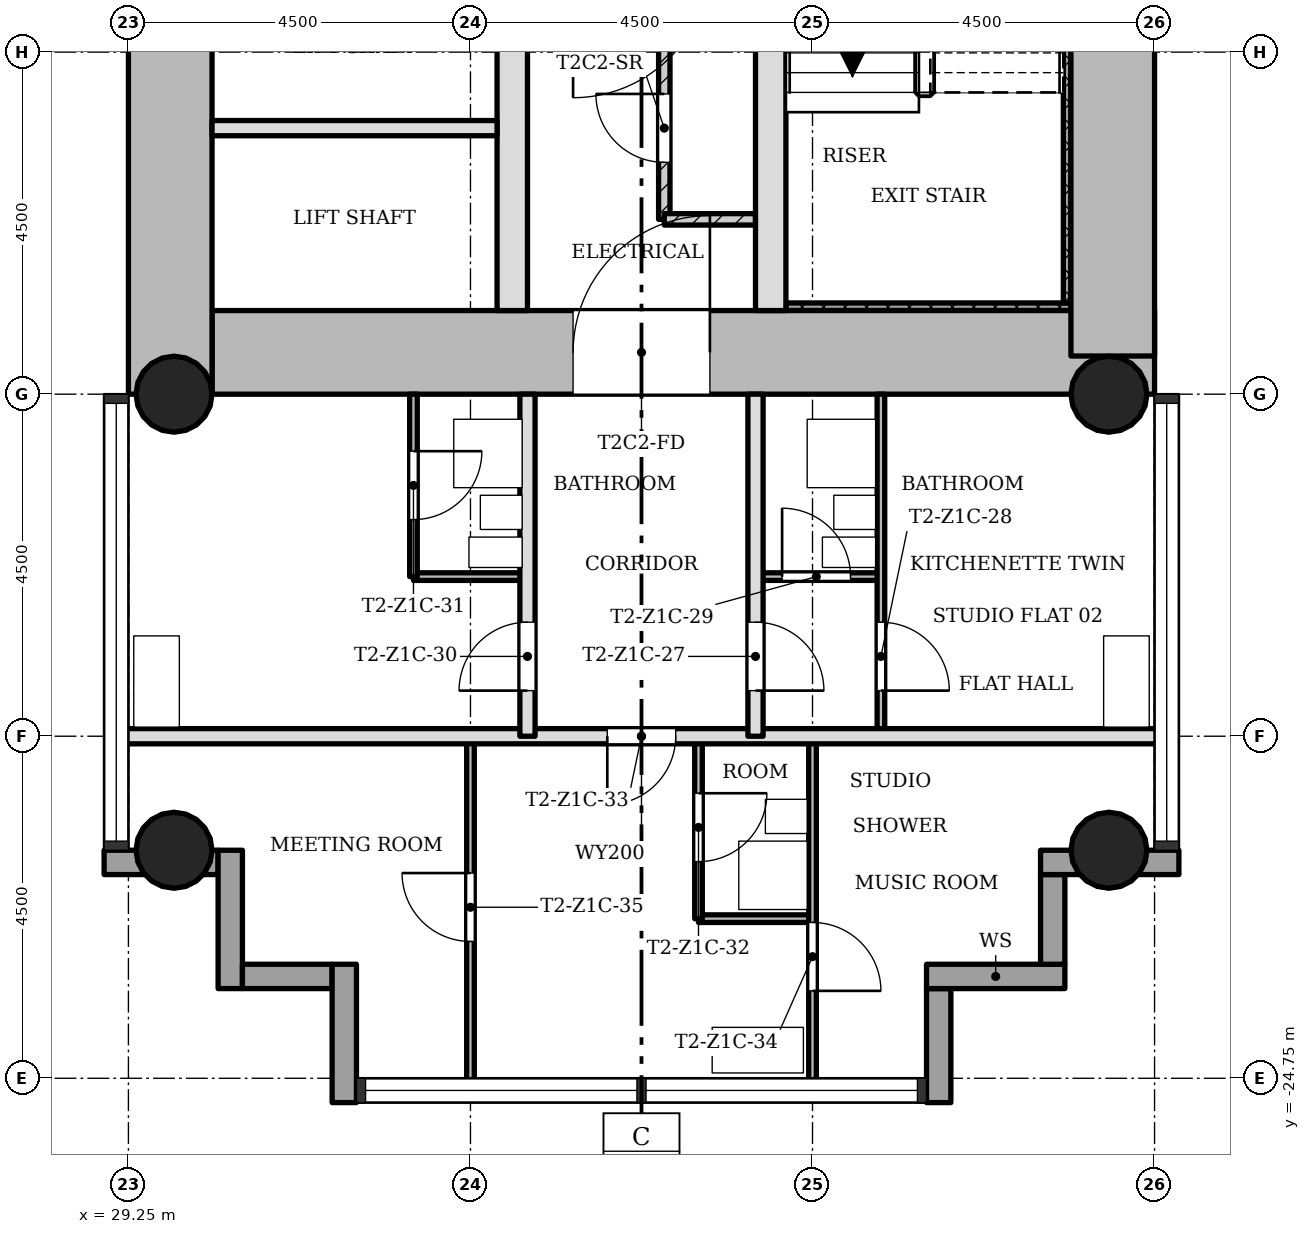
"""IFC4 building model, lengths in metres.
Left out: names, types, materials, properties, quantities, classifications, styles, units other than length and angle.
Written with IfcOpenShell. Run it as: python <this file> out.ifc"""

import sys

from ifc_helpers import new_model, si_unit, direction, frame, frame_2d, origin, origin_2d, place, context, subcontext, project, spatial, rectangle, hollow_circle, extrude, element, fill, save


model = new_model("IFC4")
c1 = context("Model", 3, precision=1e-05, world=origin(), true_north=direction((0.0, 1.0)))
c2 = subcontext(c1, "Body", "Model", "MODEL_VIEW")
j1 = project(units=[si_unit("LENGTHUNIT", "METRE"), si_unit("PLANEANGLEUNIT", "RADIAN")], contexts=[c1])
p1 = place(None, origin())
s1 = spatial("IfcSite", under=j1, at=p1, CompositionType="ELEMENT")
p2 = place(p1, origin())
s2 = spatial("IfcBuilding", under=s1, at=p2, CompositionType="ELEMENT")
p3 = place(p2, frame((0.0, 0.0, 48.3)))
s3 = spatial("IfcBuildingStorey", under=s2, at=p3, CompositionType="ELEMENT", Elevation=48.3)
p4 = place(p3, frame((30.35, -15.2, 0.0), z_axis=(0.0, 0.0, 1.0), x_axis=(1.0, 0.0, 0.0)))
e1 = element("IfcWall", 1, at=p4, inside=s3, PredefinedType="SHEAR", context=c2, shape_type="SweptSolid", body=[
    extrude(rectangle(XDim=12.4, YDim=1.1, at=frame_2d((6.2, 0.0))), origin(), (0.0, 0.0, 1.0), 3.4),
])
p5 = place(p4, frame((4.75, 0.0, 0.0)))
e2 = element("IfcOpeningElement", 2, at=p5, cuts=e1, PredefinedType="OPENING", context=c2, shape_type="SweptSolid", body=[
    extrude(rectangle(XDim=1.8, YDim=2.1, at=frame_2d((0.9, 1.05))), frame((0.0, 0.56, 0.0), z_axis=(0.0, -1.0, 0.0), x_axis=(1.0, 0.0, 0.0)), (0.0, 0.0, 1.0), 1.12),
])
p6 = place(p3, frame((42.2, -15.248, 0.0), z_axis=(0.0, 0.0, 1.0), x_axis=(0.0, 1.0, 0.0)))
e3 = element("IfcWall", 3, at=p6, inside=s3, PredefinedType="SHEAR", context=c2, shape_type="SweptSolid", body=[
    extrude(rectangle(XDim=8.596, YDim=1.1, at=frame_2d((4.298, 0.0))), origin(), (0.0, 0.0, 1.0), 3.4),
])
p7 = place(p3, frame((29.8, -7.85, 0.0), z_axis=(0.0, 0.0, 1.0), x_axis=(0.0, -1.0, 0.0)))
e4 = element("IfcWall", 4, at=p7, inside=s3, PredefinedType="SHEAR", context=c2, shape_type="SweptSolid", body=[
    extrude(rectangle(XDim=7.9, YDim=1.1, at=frame_2d((3.95, 0.0))), origin(), (0.0, 0.0, 1.0), 3.4),
])
p8 = place(p3, frame((34.3, -14.65, 0.0), z_axis=(0.0, 0.0, 1.0), x_axis=(0.0, 1.0, 0.0)))
e5 = element("IfcWall", 5, at=p8, inside=s3, PredefinedType="SHEAR", context=c2, shape_type="SweptSolid", body=[
    extrude(rectangle(XDim=6.8, YDim=0.4, at=frame_2d((3.4, 0.0))), origin(), (0.0, 0.0, 1.0), 3.4),
])
p9 = place(p8, frame((5.05, 0.0, 0.0)))
e6 = element("IfcOpeningElement", 6, at=p9, cuts=e5, PredefinedType="OPENING", context=c2, shape_type="SweptSolid", body=[
    extrude(rectangle(XDim=1.1, YDim=2.1, at=frame_2d((0.55, 1.05))), frame((0.0, 0.21, 0.0), z_axis=(0.0, -1.0, 0.0), x_axis=(1.0, 0.0, 0.0)), (0.0, 0.0, 1.0), 0.42),
])
p10 = place(p3, frame((37.7, -14.65, 0.0), z_axis=(0.0, 0.0, 1.0), x_axis=(0.0, 1.0, 0.0)))
e7 = element("IfcWall", 7, at=p10, inside=s3, PredefinedType="SHEAR", context=c2, shape_type="SweptSolid", body=[
    extrude(rectangle(XDim=6.8, YDim=0.4, at=frame_2d((3.4, 0.0))), origin(), (0.0, 0.0, 1.0), 3.4),
])
p11 = place(p10, frame((5.35, 0.0, 0.0)))
e8 = element("IfcOpeningElement", 8, at=p11, cuts=e7, PredefinedType="OPENING", context=c2, shape_type="SweptSolid", body=[
    extrude(rectangle(XDim=0.9, YDim=2.1, at=frame_2d((0.45, 1.05))), frame((0.0, 0.21, 0.0), z_axis=(0.0, -1.0, 0.0), x_axis=(1.0, 0.0, 0.0)), (0.0, 0.0, 1.0), 0.42),
])
for number, where, z_axis, x_axis in (
    (9, (42.15, -15.75, 0.0), (0.0, 0.0, 1.0), (1.0, 0.0, 0.0)),
    (10, (29.85, -15.75, 0.0), (0.0, 0.0, 1.0), (1.0, 0.0, 0.0)),
    (11, (42.15, -21.75, 0.0), (0.0, 0.0, 1.0), (1.0, 0.0, 0.0)),
    (12, (29.85, -21.75, 0.0), (0.0, 0.0, 1.0), (1.0, 0.0, 0.0)),
):
    element("IfcColumn", number, at=place(p3, frame(where, z_axis=z_axis, x_axis=x_axis)), inside=s3, PredefinedType="COLUMN", context=c2, shape_type="SweptSolid", body=[
        extrude(hollow_circle(Radius=0.5, WallThickness=0.036, at=origin_2d()), origin(), (0.0, 0.0, 1.0), 3.4),
    ])
p12 = place(p3, frame((39.91, -25.07, -0.3), z_axis=(0.0, 0.0, 1.0), x_axis=(0.0, 1.0, 0.0)))
e13 = element("IfcWall", 13, at=p12, inside=s3, PredefinedType="STANDARD", context=c2, shape_type="SweptSolid", body=[
    extrude(rectangle(XDim=1.5, YDim=0.32, at=frame_2d((0.75, 0.0))), origin(), (0.0, 0.0, 1.0), 3.4),
])
p13 = place(p3, frame((39.75, -23.41, -0.3), z_axis=(0.0, 0.0, 1.0), x_axis=(1.0, 0.0, 0.0)))
e14 = element("IfcWall", 14, at=p13, inside=s3, PredefinedType="STANDARD", context=c2, shape_type="SweptSolid", body=[
    extrude(rectangle(XDim=1.82, YDim=0.32, at=frame_2d((0.91, 0.0))), origin(), (0.0, 0.0, 1.0), 3.4),
])
p14 = place(p3, frame((41.41, -23.25, -0.3), z_axis=(0.0, 0.0, 1.0), x_axis=(0.0, 1.0, 0.0)))
e15 = element("IfcWall", 15, at=p14, inside=s3, PredefinedType="STANDARD", context=c2, shape_type="SweptSolid", body=[
    extrude(rectangle(XDim=1.18, YDim=0.32, at=frame_2d((0.59, 0.0))), origin(), (0.0, 0.0, 1.0), 3.4),
])
p15 = place(p3, frame((41.25, -21.91, -0.3), z_axis=(0.0, 0.0, 1.0), x_axis=(1.0, 0.0, 0.0)))
e16 = element("IfcWall", 16, at=p15, inside=s3, PredefinedType="STANDARD", context=c2, shape_type="SweptSolid", body=[
    extrude(rectangle(XDim=1.82, YDim=0.32, at=frame_2d((0.91, 0.0))), origin(), (0.0, 0.0, 1.0), 3.4),
])
p16 = place(p3, frame((28.93, -21.91, -0.3), z_axis=(0.0, 0.0, 1.0), x_axis=(1.0, 0.0, 0.0)))
e17 = element("IfcWall", 17, at=p16, inside=s3, PredefinedType="STANDARD", context=c2, shape_type="SweptSolid", body=[
    extrude(rectangle(XDim=1.5, YDim=0.32, at=frame_2d((0.75, 0.0))), origin(), (0.0, 0.0, 1.0), 3.4),
])
p17 = place(p3, frame((30.59, -21.75, -0.3), z_axis=(0.0, 0.0, 1.0), x_axis=(0.0, -1.0, 0.0)))
e18 = element("IfcWall", 18, at=p17, inside=s3, PredefinedType="STANDARD", context=c2, shape_type="SweptSolid", body=[
    extrude(rectangle(XDim=1.82, YDim=0.32, at=frame_2d((0.91, 0.0))), origin(), (0.0, 0.0, 1.0), 3.4),
])
p18 = place(p3, frame((30.75, -23.41, -0.3), z_axis=(0.0, 0.0, 1.0), x_axis=(1.0, 0.0, 0.0)))
e19 = element("IfcWall", 19, at=p18, inside=s3, PredefinedType="STANDARD", context=c2, shape_type="SweptSolid", body=[
    extrude(rectangle(XDim=1.18, YDim=0.32, at=frame_2d((0.59, 0.0))), origin(), (0.0, 0.0, 1.0), 3.4),
])
p19 = place(p3, frame((32.09, -23.25, -0.3), z_axis=(0.0, 0.0, 1.0), x_axis=(0.0, -1.0, 0.0)))
e20 = element("IfcWall", 20, at=p19, inside=s3, PredefinedType="STANDARD", context=c2, shape_type="SweptSolid", body=[
    extrude(rectangle(XDim=1.82, YDim=0.32, at=frame_2d((0.91, 0.0))), origin(), (0.0, 0.0, 1.0), 3.4),
])
p20 = place(p3, frame((30.35, -12.25, 0.0), z_axis=(0.0, 0.0, 1.0), x_axis=(1.0, 0.0, 0.0)))
e21 = element("IfcWall", 21, at=p20, inside=s3, PredefinedType="SOLIDWALL", context=c2, shape_type="SweptSolid", body=[
    extrude(rectangle(XDim=3.75, YDim=0.2, at=frame_2d((1.875, 0.0))), origin(), (0.0, 0.0, 1.0), 3.0),
])
p21 = place(p3, frame((36.3, -11.05, 0.0), z_axis=(0.0, 0.0, 1.0), x_axis=(0.0, -1.0, 0.0)))
e22 = element("IfcWall", 22, at=p21, inside=s3, PredefinedType="PARTITIONING", context=c2, shape_type="SweptSolid", body=[
    extrude(rectangle(XDim=2.4, YDim=0.15, at=frame_2d((1.2, 0.0))), origin(), (0.0, 0.0, 1.0), 3.0),
])
p22 = place(p21, frame((0.75, 0.0, 0.0)))
e23 = element("IfcOpeningElement", 23, at=p22, cuts=e22, PredefinedType="OPENING", context=c2, shape_type="SweptSolid", body=[
    extrude(rectangle(XDim=0.9, YDim=2.1, at=frame_2d((0.45, 1.05))), frame((0.0, 0.085, 0.0), z_axis=(0.0, -1.0, 0.0), x_axis=(1.0, 0.0, 0.0)), (0.0, 0.0, 1.0), 0.17),
])
p23 = place(p3, frame((36.3, -13.45, 0.0), z_axis=(0.0, 0.0, 1.0), x_axis=(1.0, 0.0, 0.0)))
e24 = element("IfcWall", 24, at=p23, inside=s3, PredefinedType="PARTITIONING", context=c2, shape_type="SweptSolid", body=[
    extrude(rectangle(XDim=1.2, YDim=0.15, at=frame_2d((0.6, 0.0))), origin(), (0.0, 0.0, 1.0), 3.0),
])
p24 = place(p3, frame((38.25, -22.65, 0.0), z_axis=(0.0, 0.0, 1.0), x_axis=(-1.0, 0.0, 0.0)))
e25 = element("IfcWall", 25, at=p24, inside=s3, PredefinedType="PARTITIONING", context=c2, shape_type="SweptSolid", body=[
    extrude(rectangle(XDim=1.5, YDim=0.1, at=frame_2d((0.75, 0.0))), origin(), (0.0, 0.0, 1.0), 3.0),
])
p25 = place(p3, frame((42.85, -20.25, 0.0), z_axis=(0.0, 0.0, 1.0), x_axis=(-1.0, 0.0, 0.0)))
e26 = element("IfcWall", 26, at=p25, inside=s3, PredefinedType="SOLIDWALL", context=c2, shape_type="SweptSolid", body=[
    extrude(rectangle(XDim=13.7, YDim=0.2, at=frame_2d((6.85, 0.0))), origin(), (0.0, 0.0, 1.0), 3.0),
])
p26 = place(p25, frame((6.4, 0.0, 0.0)))
e27 = element("IfcOpeningElement", 27, at=p26, cuts=e26, PredefinedType="OPENING", context=c2, shape_type="SweptSolid", body=[
    extrude(rectangle(XDim=0.9, YDim=2.1, at=frame_2d((0.45, 1.05))), frame((0.0, 0.11, 0.0), z_axis=(0.0, -1.0, 0.0), x_axis=(1.0, 0.0, 0.0)), (0.0, 0.0, 1.0), 0.22),
])
p27 = place(p3, frame((39.15, -18.15, 0.0), z_axis=(0.0, 0.0, 1.0), x_axis=(-1.0, 0.0, 0.0)))
e28 = element("IfcWall", 28, at=p27, inside=s3, PredefinedType="PARTITIONING", context=c2, shape_type="SweptSolid", body=[
    extrude(rectangle(XDim=1.65, YDim=0.1, at=frame_2d((0.825, 0.0))), origin(), (0.0, 0.0, 1.0), 3.0),
])
p28 = place(p27, frame((0.4, 0.0, 0.0)))
e29 = element("IfcOpeningElement", 29, at=p28, cuts=e28, PredefinedType="OPENING", context=c2, shape_type="SweptSolid", body=[
    extrude(rectangle(XDim=0.9, YDim=2.1, at=frame_2d((0.45, 1.05))), frame((0.0, 0.06, 0.0), z_axis=(0.0, -1.0, 0.0), x_axis=(1.0, 0.0, 0.0)), (0.0, 0.0, 1.0), 0.12),
])
p29 = place(p3, frame((34.5, -18.15, 0.0), z_axis=(0.0, 0.0, 1.0), x_axis=(-1.0, 0.0, 0.0)))
e30 = element("IfcWall", 30, at=p29, inside=s3, PredefinedType="PARTITIONING", context=c2, shape_type="SweptSolid", body=[
    extrude(rectangle(XDim=1.5, YDim=0.1, at=frame_2d((0.75, 0.0))), origin(), (0.0, 0.0, 1.0), 3.0),
])
p30 = place(p3, frame((39.15, -20.25, 0.0), z_axis=(0.0, 0.0, 1.0), x_axis=(0.0, 1.0, 0.0)))
e31 = element("IfcWall", 31, at=p30, inside=s3, PredefinedType="PARTITIONING", context=c2, shape_type="SweptSolid", body=[
    extrude(rectangle(XDim=4.5, YDim=0.1, at=frame_2d((2.25, 0.0))), origin(), (0.0, 0.0, 1.0), 3.0),
])
p31 = place(p30, frame((0.6, 0.0, 0.0)))
e32 = element("IfcOpeningElement", 32, at=p31, cuts=e31, PredefinedType="OPENING", context=c2, shape_type="SweptSolid", body=[
    extrude(rectangle(XDim=0.9, YDim=2.1, at=frame_2d((0.45, 1.05))), frame((0.0, 0.06, 0.0), z_axis=(0.0, -1.0, 0.0), x_axis=(1.0, 0.0, 0.0)), (0.0, 0.0, 1.0), 0.12),
])
p32 = place(p3, frame((38.25, -24.85, 0.0), z_axis=(0.0, 0.0, 1.0), x_axis=(0.0, 1.0, 0.0)))
e33 = element("IfcWall", 33, at=p32, inside=s3, PredefinedType="PARTITIONING", context=c2, shape_type="SweptSolid", body=[
    extrude(rectangle(XDim=4.6, YDim=0.1, at=frame_2d((2.3, 0.0))), origin(), (0.0, 0.0, 1.0), 3.0),
])
p33 = place(p32, frame((1.25, 0.0, 0.0)))
e34 = element("IfcOpeningElement", 34, at=p33, cuts=e33, PredefinedType="OPENING", context=c2, shape_type="SweptSolid", body=[
    extrude(rectangle(XDim=0.9, YDim=2.1, at=frame_2d((0.45, 1.05))), frame((0.0, 0.06, 0.0), z_axis=(0.0, -1.0, 0.0), x_axis=(1.0, 0.0, 0.0)), (0.0, 0.0, 1.0), 0.12),
])
p34 = place(p3, frame((37.5, -20.25, 0.0), z_axis=(0.0, 0.0, 1.0), x_axis=(0.0, 1.0, 0.0)))
e35 = element("IfcWall", 35, at=p34, inside=s3, PredefinedType="SOLIDWALL", context=c2, shape_type="SweptSolid", body=[
    extrude(rectangle(XDim=4.5, YDim=0.2, at=frame_2d((2.25, 0.0))), origin(), (0.0, 0.0, 1.0), 3.0),
])
p35 = place(p34, frame((0.6, 0.0, 0.0)))
e36 = element("IfcOpeningElement", 36, at=p35, cuts=e35, PredefinedType="OPENING", context=c2, shape_type="SweptSolid", body=[
    extrude(rectangle(XDim=0.9, YDim=2.1, at=frame_2d((0.45, 1.05))), frame((0.0, 0.11, 0.0), z_axis=(0.0, -1.0, 0.0), x_axis=(1.0, 0.0, 0.0)), (0.0, 0.0, 1.0), 0.22),
])
p36 = place(p3, frame((36.75, -22.65, 0.0), z_axis=(0.0, 0.0, 1.0), x_axis=(0.0, 1.0, 0.0)))
e37 = element("IfcWall", 37, at=p36, inside=s3, PredefinedType="PARTITIONING", context=c2, shape_type="SweptSolid", body=[
    extrude(rectangle(XDim=2.4, YDim=0.1, at=frame_2d((1.2, 0.0))), origin(), (0.0, 0.0, 1.0), 3.0),
])
p37 = place(p36, frame((0.75, 0.0, 0.0)))
e38 = element("IfcOpeningElement", 38, at=p37, cuts=e37, PredefinedType="OPENING", context=c2, shape_type="SweptSolid", body=[
    extrude(rectangle(XDim=0.9, YDim=2.1, at=frame_2d((0.45, 1.05))), frame((0.0, 0.06, 0.0), z_axis=(0.0, -1.0, 0.0), x_axis=(1.0, 0.0, 0.0)), (0.0, 0.0, 1.0), 0.12),
])
p38 = place(p3, frame((34.5, -20.25, 0.0), z_axis=(0.0, 0.0, 1.0), x_axis=(0.0, 1.0, 0.0)))
e39 = element("IfcWall", 39, at=p38, inside=s3, PredefinedType="SOLIDWALL", context=c2, shape_type="SweptSolid", body=[
    extrude(rectangle(XDim=4.5, YDim=0.2, at=frame_2d((2.25, 0.0))), origin(), (0.0, 0.0, 1.0), 3.0),
])
p39 = place(p38, frame((0.6, 0.0, 0.0)))
e40 = element("IfcOpeningElement", 40, at=p39, cuts=e39, PredefinedType="OPENING", context=c2, shape_type="SweptSolid", body=[
    extrude(rectangle(XDim=0.9, YDim=2.1, at=frame_2d((0.45, 1.05))), frame((0.0, 0.11, 0.0), z_axis=(0.0, -1.0, 0.0), x_axis=(1.0, 0.0, 0.0)), (0.0, 0.0, 1.0), 0.22),
])
p40 = place(p3, frame((33.75, -24.85, 0.0), z_axis=(0.0, 0.0, 1.0), x_axis=(0.0, 1.0, 0.0)))
e41 = element("IfcWall", 41, at=p40, inside=s3, PredefinedType="PARTITIONING", context=c2, shape_type="SweptSolid", body=[
    extrude(rectangle(XDim=4.6, YDim=0.1, at=frame_2d((2.3, 0.0))), origin(), (0.0, 0.0, 1.0), 3.0),
])
p41 = place(p40, frame((1.9, 0.0, 0.0)))
e42 = element("IfcOpeningElement", 42, at=p41, cuts=e41, PredefinedType="OPENING", context=c2, shape_type="SweptSolid", body=[
    extrude(rectangle(XDim=0.9, YDim=2.1, at=frame_2d((0.45, 1.05))), frame((0.0, 0.06, 0.0), z_axis=(0.0, -1.0, 0.0), x_axis=(1.0, 0.0, 0.0)), (0.0, 0.0, 1.0), 0.12),
])
p42 = place(p3, frame((33.0, -18.15, 0.0), z_axis=(0.0, 0.0, 1.0), x_axis=(0.0, 1.0, 0.0)))
e43 = element("IfcWall", 43, at=p42, inside=s3, PredefinedType="PARTITIONING", context=c2, shape_type="SweptSolid", body=[
    extrude(rectangle(XDim=2.4, YDim=0.1, at=frame_2d((1.2, 0.0))), origin(), (0.0, 0.0, 1.0), 3.0),
])
p43 = place(p42, frame((0.75, 0.0, 0.0)))
e44 = element("IfcOpeningElement", 44, at=p43, cuts=e43, PredefinedType="OPENING", context=c2, shape_type="SweptSolid", body=[
    extrude(rectangle(XDim=0.9, YDim=2.1, at=frame_2d((0.45, 1.05))), frame((0.0, 0.06, 0.0), z_axis=(0.0, -1.0, 0.0), x_axis=(1.0, 0.0, 0.0)), (0.0, 0.0, 1.0), 0.12),
])
p44 = place(p3, frame((37.9, -14.6, 0.0), z_axis=(0.0, 0.0, 1.0), x_axis=(1.0, 0.0, 0.0)))
e45 = element("IfcWall", 45, at=p44, inside=s3, PredefinedType="SHEAR", context=c2, shape_type="SweptSolid", body=[
    extrude(rectangle(XDim=3.75, YDim=0.1, at=frame_2d((1.875, 0.0))), origin(), (0.0, 0.0, 1.0), 3.4),
])
p45 = place(p3, frame((41.6, -7.95, 0.0), z_axis=(0.0, 0.0, 1.0), x_axis=(0.0, -1.0, 0.0)))
e46 = element("IfcWall", 46, at=p45, inside=s3, PredefinedType="SHEAR", context=c2, shape_type="SweptSolid", body=[
    extrude(rectangle(XDim=6.6, YDim=0.1, at=frame_2d((3.3, 0.0))), origin(), (0.0, 0.0, 1.0), 3.4),
])
p46 = place(p22, origin())
e47 = element("IfcDoor", 47, at=p46, inside=s3, OperationType="SINGLE_SWING_LEFT", PredefinedType="DOOR", context=c2, shape_type="SweptSolid", body=[
    extrude(rectangle(XDim=0.9, YDim=2.1, at=frame_2d((0.45, 1.05))), frame((0.0, 0.025, 0.0), z_axis=(0.0, -1.0, 0.0), x_axis=(1.0, 0.0, 0.0)), (0.0, 0.0, 1.0), 0.05),
])
fill(e23, e47)
p47 = place(p35, origin())
e48 = element("IfcDoor", 48, at=p47, inside=s3, OperationType="SINGLE_SWING_LEFT", PredefinedType="DOOR", context=c2, shape_type="SweptSolid", body=[
    extrude(rectangle(XDim=0.9, YDim=2.1, at=frame_2d((0.45, 1.05))), frame((0.0, 0.025, 0.0), z_axis=(0.0, -1.0, 0.0), x_axis=(1.0, 0.0, 0.0)), (0.0, 0.0, 1.0), 0.05),
])
fill(e36, e48)
p48 = place(p31, origin())
e49 = element("IfcDoor", 49, at=p48, inside=s3, OperationType="SINGLE_SWING_LEFT", PredefinedType="DOOR", context=c2, shape_type="SweptSolid", body=[
    extrude(rectangle(XDim=0.9, YDim=2.1, at=frame_2d((0.45, 1.05))), frame((0.0, 0.025, 0.0), z_axis=(0.0, -1.0, 0.0), x_axis=(1.0, 0.0, 0.0)), (0.0, 0.0, 1.0), 0.05),
])
fill(e32, e49)
p49 = place(p28, origin())
e50 = element("IfcDoor", 50, at=p49, inside=s3, OperationType="SINGLE_SWING_RIGHT", PredefinedType="DOOR", context=c2, shape_type="SweptSolid", body=[
    extrude(rectangle(XDim=0.9, YDim=2.1, at=frame_2d((0.45, 1.05))), frame((0.0, 0.025, 0.0), z_axis=(0.0, -1.0, 0.0), x_axis=(1.0, 0.0, 0.0)), (0.0, 0.0, 1.0), 0.05),
])
fill(e29, e50)
p50 = place(p39, origin())
e51 = element("IfcDoor", 51, at=p50, inside=s3, OperationType="SINGLE_SWING_RIGHT", PredefinedType="DOOR", context=c2, shape_type="SweptSolid", body=[
    extrude(rectangle(XDim=0.9, YDim=2.1, at=frame_2d((0.45, 1.05))), frame((0.0, 0.025, 0.0), z_axis=(0.0, -1.0, 0.0), x_axis=(1.0, 0.0, 0.0)), (0.0, 0.0, 1.0), 0.05),
])
fill(e40, e51)
p51 = place(p43, origin())
e52 = element("IfcDoor", 52, at=p51, inside=s3, OperationType="SINGLE_SWING_RIGHT", PredefinedType="DOOR", context=c2, shape_type="SweptSolid", body=[
    extrude(rectangle(XDim=0.9, YDim=2.1, at=frame_2d((0.45, 1.05))), frame((0.0, 0.025, 0.0), z_axis=(0.0, -1.0, 0.0), x_axis=(1.0, 0.0, 0.0)), (0.0, 0.0, 1.0), 0.05),
])
fill(e44, e52)
p52 = place(p37, origin())
e53 = element("IfcDoor", 53, at=p52, inside=s3, OperationType="SINGLE_SWING_RIGHT", PredefinedType="DOOR", context=c2, shape_type="SweptSolid", body=[
    extrude(rectangle(XDim=0.9, YDim=2.1, at=frame_2d((0.45, 1.05))), frame((0.0, 0.025, 0.0), z_axis=(0.0, -1.0, 0.0), x_axis=(1.0, 0.0, 0.0)), (0.0, 0.0, 1.0), 0.05),
])
fill(e38, e53)
p53 = place(p26, origin())
e54 = element("IfcDoor", 54, at=p53, inside=s3, OperationType="SINGLE_SWING_LEFT", PredefinedType="DOOR", context=c2, shape_type="SweptSolid", body=[
    extrude(rectangle(XDim=0.9, YDim=2.1, at=frame_2d((0.45, 1.05))), frame((0.0, 0.025, 0.0), z_axis=(0.0, -1.0, 0.0), x_axis=(1.0, 0.0, 0.0)), (0.0, 0.0, 1.0), 0.05),
])
fill(e27, e54)
p54 = place(p33, origin())
e55 = element("IfcDoor", 55, at=p54, inside=s3, OperationType="SINGLE_SWING_LEFT", PredefinedType="DOOR", context=c2, shape_type="SweptSolid", body=[
    extrude(rectangle(XDim=0.9, YDim=2.1, at=frame_2d((0.45, 1.05))), frame((0.0, 0.025, 0.0), z_axis=(0.0, -1.0, 0.0), x_axis=(1.0, 0.0, 0.0)), (0.0, 0.0, 1.0), 0.05),
])
fill(e34, e55)
p55 = place(p41, origin())
e56 = element("IfcDoor", 56, at=p55, inside=s3, OperationType="SINGLE_SWING_LEFT", PredefinedType="DOOR", context=c2, shape_type="SweptSolid", body=[
    extrude(rectangle(XDim=0.9, YDim=2.1, at=frame_2d((0.45, 1.05))), frame((0.0, 0.025, 0.0), z_axis=(0.0, -1.0, 0.0), x_axis=(1.0, 0.0, 0.0)), (0.0, 0.0, 1.0), 0.05),
])
fill(e42, e56)
p56 = place(p5, origin())
e57 = element("IfcDoor", 57, at=p56, inside=s3, OperationType="SINGLE_SWING_LEFT", PredefinedType="DOOR", context=c2, shape_type="SweptSolid", body=[
    extrude(rectangle(XDim=1.8, YDim=2.1, at=frame_2d((0.9, 1.05))), frame((0.0, 0.025, 0.0), z_axis=(0.0, -1.0, 0.0), x_axis=(1.0, 0.0, 0.0)), (0.0, 0.0, 1.0), 0.05),
])
fill(e2, e57)
save(model, sys.argv[1])
